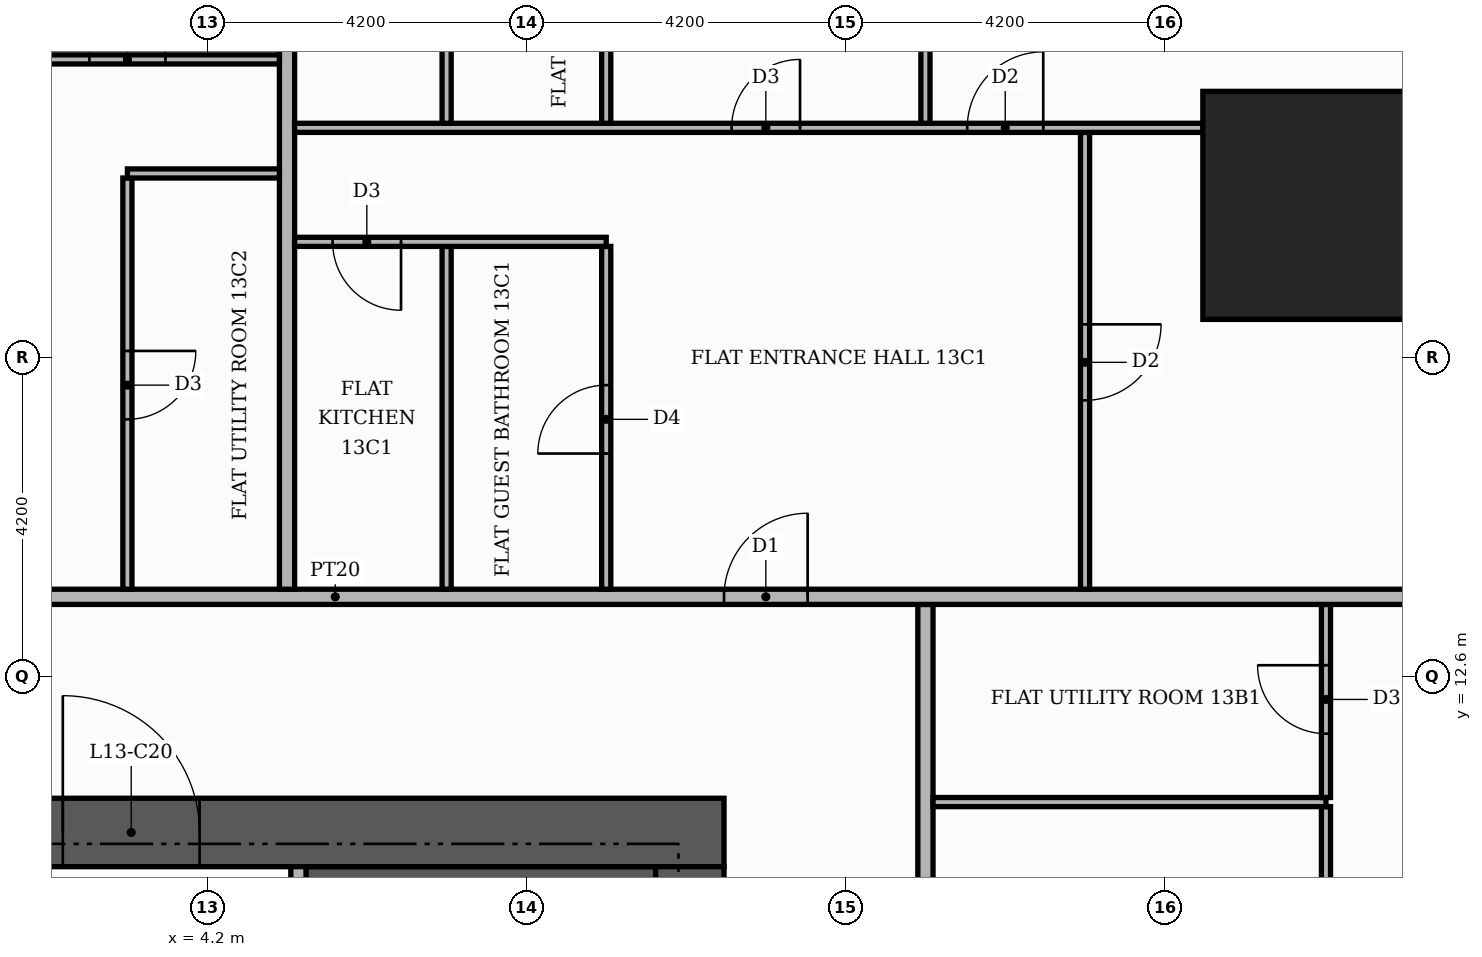
"""IFC4 building model, lengths in metres.
Left out: names, types, materials, properties, quantities, classifications, styles, units other than length and angle.
Written with IfcOpenShell. Run it as: python <this file> out.ifc"""

import sys

from ifc_helpers import new_model, si_unit, direction, frame, frame_2d, origin, origin_2d, place, context, subcontext, project, spatial, rectangle, extrude, element, fill, save


model = new_model("IFC4")
c1 = context("Model", 3, precision=1e-05, world=origin(), true_north=direction((0.0, 1.0)))
c2 = subcontext(c1, "Body", "Model", "MODEL_VIEW")
j1 = project(units=[si_unit("LENGTHUNIT", "METRE"), si_unit("PLANEANGLEUNIT", "RADIAN")], contexts=[c1])
p1 = place(None, origin())
s1 = spatial("IfcSite", under=j1, at=p1, CompositionType="ELEMENT")
p2 = place(p1, origin())
s2 = spatial("IfcBuilding", under=s1, at=p2, CompositionType="ELEMENT")
p3 = place(p2, frame((0.0, 0.0, 58.2)))
s3 = spatial("IfcBuildingStorey", under=s2, at=p3, CompositionType="ELEMENT", Elevation=58.2)
p4 = place(p3, frame((5.5, 9.15, 0.0), z_axis=(0.0, 0.0, 1.0), x_axis=(1.0, 0.0, 0.0)))
e1 = element("IfcWall", 1, at=p4, inside=s3, PredefinedType="SHEAR", context=c2, shape_type="SweptSolid", body=[
    extrude(rectangle(XDim=4.6, YDim=1.9, at=frame_2d((2.3, 0.0))), origin(), (0.0, 0.0, 1.0), 3.48),
])
p5 = place(p3, frame((-11.0, 10.55, 0.0), z_axis=(0.0, 0.0, 1.0), x_axis=(1.0, 0.0, 0.0)))
e2 = element("IfcWall", 2, at=p5, inside=s3, PredefinedType="SHEAR", context=c2, shape_type="SweptSolid", body=[
    extrude(rectangle(XDim=22.0, YDim=0.9, at=frame_2d((11.0, 0.0))), origin(), (0.0, 0.0, 1.0), 3.48),
])
p6 = place(p5, frame((13.3, 0.0, 0.0)))
e3 = element("IfcOpeningElement", 3, at=p6, cuts=e2, PredefinedType="OPENING", context=c2, shape_type="SweptSolid", body=[
    extrude(rectangle(XDim=1.8, YDim=2.2, at=frame_2d((0.9, 1.1))), frame((0.0, 0.46, 0.0), z_axis=(0.0, -1.0, 0.0), x_axis=(1.0, 0.0, 0.0)), (0.0, 0.0, 1.0), 0.92),
])
p7 = place(p3, frame((10.55, -10.1, 0.0), z_axis=(0.0, 0.0, 1.0), x_axis=(0.0, 1.0, 0.0)))
e4 = element("IfcWall", 4, at=p7, inside=s3, PredefinedType="SHEAR", context=c2, shape_type="SweptSolid", body=[
    extrude(rectangle(XDim=20.2, YDim=0.9, at=frame_2d((10.1, 0.0))), origin(), (0.0, 0.0, 1.0), 3.48),
])
p8 = place(p3, frame((18.8, 18.8, 0.0), z_axis=(0.0, 0.0, 1.0), x_axis=(1.0, 0.0, 0.0)))
e5 = element("IfcColumn", 5, at=p8, inside=s3, PredefinedType="COLUMN", context=c2, shape_type="SweptSolid", body=[
    extrude(rectangle(XDim=3.0, YDim=3.0, at=origin_2d()), origin(), (0.0, 0.0, 1.0), 3.9),
])
p9 = place(p3, frame((5.4, 5.5, 0.0), z_axis=(0.0, 0.0, 1.0), x_axis=(0.0, 1.0, 0.0)))
e6 = element("IfcWall", 6, at=p9, inside=s3, PredefinedType="PARTITIONING", context=c2, shape_type="SweptSolid", body=[
    extrude(rectangle(XDim=4.6, YDim=0.2, at=frame_2d((2.3, 0.0))), origin(), (0.0, 0.0, 1.0), 3.48),
])
p10 = place(p9, frame((0.25, 0.0, 0.0)))
e7 = element("IfcOpeningElement", 7, at=p10, cuts=e6, PredefinedType="OPENING", context=c2, shape_type="SweptSolid", body=[
    extrude(rectangle(XDim=1.0, YDim=2.1, at=frame_2d((0.5, 1.05))), frame((0.0, 0.11, 0.0), z_axis=(0.0, -1.0, 0.0), x_axis=(1.0, 0.0, 0.0)), (0.0, 0.0, 1.0), 0.22),
])
p11 = place(p3, frame((13.65, -13.55, 0.0), z_axis=(0.0, 0.0, 1.0), x_axis=(0.0, 1.0, 0.0)))
e8 = element("IfcWall", 8, at=p11, inside=s3, PredefinedType="PARTITIONING", context=c2, shape_type="SweptSolid", body=[
    extrude(rectangle(XDim=27.1, YDim=0.2, at=frame_2d((13.55, 0.0))), origin(), (0.0, 0.0, 1.0), 3.48),
])
p12 = place(p11, frame((1.45, 0.0, 0.0)))
e9 = element("IfcOpeningElement", 9, at=p12, cuts=e8, PredefinedType="OPENING", context=c2, shape_type="SweptSolid", body=[
    extrude(rectangle(XDim=1.1, YDim=2.4, at=frame_2d((0.55, 1.2))), frame((0.0, 0.11, 0.0), z_axis=(0.0, -1.0, 0.0), x_axis=(1.0, 0.0, 0.0)), (0.0, 0.0, 1.0), 0.22),
])
p13 = place(p3, frame((18.92, 7.26, 0.0), z_axis=(0.0, 0.0, 1.0), x_axis=(0.0, 1.0, 0.0)))
e10 = element("IfcWall", 10, at=p13, inside=s3, PredefinedType="PARTITIONING", context=c2, shape_type="SweptSolid", body=[
    extrude(rectangle(XDim=3.63, YDim=0.12, at=frame_2d((1.815, 0.0))), origin(), (0.0, 0.0, 1.0), 3.48),
])
p14 = place(p13, frame((1.365, 0.0, 0.0)))
e11 = element("IfcOpeningElement", 11, at=p14, cuts=e10, PredefinedType="OPENING", context=c2, shape_type="SweptSolid", body=[
    extrude(rectangle(XDim=0.9, YDim=2.1, at=frame_2d((0.45, 1.05))), frame((0.0, 0.07, 0.0), z_axis=(0.0, -1.0, 0.0), x_axis=(1.0, 0.0, 0.0)), (0.0, 0.0, 1.0), 0.14),
])
p15 = place(p3, frame((13.75, 10.95, 0.0), z_axis=(0.0, 0.0, 1.0), x_axis=(1.0, 0.0, 0.0)))
e12 = element("IfcWall", 12, at=p15, inside=s3, PredefinedType="PARTITIONING", context=c2, shape_type="SweptSolid", body=[
    extrude(rectangle(XDim=5.17, YDim=0.12, at=frame_2d((2.585, 0.0))), origin(), (0.0, 0.0, 1.0), 3.48),
])
p16 = place(p3, frame((18.92, 11.01, 0.0), z_axis=(0.0, 0.0, 1.0), x_axis=(0.0, 1.0, 0.0)))
e13 = element("IfcWall", 13, at=p16, inside=s3, PredefinedType="PARTITIONING", context=c2, shape_type="SweptSolid", body=[
    extrude(rectangle(XDim=2.54, YDim=0.12, at=frame_2d((1.27, 0.0))), origin(), (0.0, 0.0, 1.0), 3.48),
])
p17 = place(p16, frame((0.84, 0.0, 0.0)))
e14 = element("IfcOpeningElement", 14, at=p17, cuts=e13, PredefinedType="OPENING", context=c2, shape_type="SweptSolid", body=[
    extrude(rectangle(XDim=0.9, YDim=2.1, at=frame_2d((0.45, 1.05))), frame((0.0, 0.07, 0.0), z_axis=(0.0, -1.0, 0.0), x_axis=(1.0, 0.0, 0.0)), (0.0, 0.0, 1.0), 0.14),
])
p18 = place(p3, frame((-13.65, 13.65, 0.0), z_axis=(0.0, 0.0, 1.0), x_axis=(1.0, 0.0, 0.0)))
e15 = element("IfcWall", 15, at=p18, inside=s3, PredefinedType="PARTITIONING", context=c2, shape_type="SweptSolid", body=[
    extrude(rectangle(XDim=39.07, YDim=0.2, at=frame_2d((19.535, 0.0))), origin(), (0.0, 0.0, 1.0), 3.48),
])
p19 = place(p18, frame((24.65, 0.0, 0.0)))
e16 = element("IfcOpeningElement", 16, at=p19, cuts=e15, PredefinedType="OPENING", context=c2, shape_type="SweptSolid", body=[
    extrude(rectangle(XDim=1.1, YDim=2.4, at=frame_2d((0.55, 1.2))), frame((0.0, 0.11, 0.0), z_axis=(0.0, -1.0, 0.0), x_axis=(1.0, 0.0, 0.0)), (0.0, 0.0, 1.0), 0.22),
])
p20 = place(p18, frame((14.15, 0.0, 0.0)))
e17 = element("IfcOpeningElement", 17, at=p20, cuts=e15, PredefinedType="OPENING", context=c2, shape_type="SweptSolid", body=[
    extrude(rectangle(XDim=1.1, YDim=2.4, at=frame_2d((0.55, 1.2))), frame((0.0, 0.11, 0.0), z_axis=(0.0, -1.0, 0.0), x_axis=(1.0, 0.0, 0.0)), (0.0, 0.0, 1.0), 0.22),
])
p21 = place(p3, frame((3.15, 13.75, 0.0), z_axis=(0.0, 0.0, 1.0), x_axis=(0.0, 1.0, 0.0)))
e18 = element("IfcWall", 18, at=p21, inside=s3, PredefinedType="PARTITIONING", context=c2, shape_type="SweptSolid", body=[
    extrude(rectangle(XDim=5.41, YDim=0.12, at=frame_2d((2.705, 0.0))), origin(), (0.0, 0.0, 1.0), 3.48),
])
p22 = place(p21, frame((2.235, 0.0, 0.0)))
e19 = element("IfcOpeningElement", 19, at=p22, cuts=e18, PredefinedType="OPENING", context=c2, shape_type="SweptSolid", body=[
    extrude(rectangle(XDim=0.9, YDim=2.1, at=frame_2d((0.45, 1.05))), frame((0.0, 0.07, 0.0), z_axis=(0.0, -1.0, 0.0), x_axis=(1.0, 0.0, 0.0)), (0.0, 0.0, 1.0), 0.14),
])
p23 = place(p3, frame((5.25, 13.75, 0.0), z_axis=(0.0, 0.0, 1.0), x_axis=(0.0, 1.0, 0.0)))
e20 = element("IfcWall", 20, at=p23, inside=s3, PredefinedType="PARTITIONING", context=c2, shape_type="SweptSolid", body=[
    extrude(rectangle(XDim=11.67, YDim=0.2, at=frame_2d((5.835, 0.0))), origin(), (0.0, 0.0, 1.0), 3.48),
])
p24 = place(p3, frame((7.35, 13.75, 0.0), z_axis=(0.0, 0.0, 1.0), x_axis=(0.0, 1.0, 0.0)))
e21 = element("IfcWall", 21, at=p24, inside=s3, PredefinedType="PARTITIONING", context=c2, shape_type="SweptSolid", body=[
    extrude(rectangle(XDim=4.51, YDim=0.12, at=frame_2d((2.255, 0.0))), origin(), (0.0, 0.0, 1.0), 3.48),
])
p25 = place(p3, frame((9.45, 13.75, 0.0), z_axis=(0.0, 0.0, 1.0), x_axis=(0.0, 1.0, 0.0)))
e22 = element("IfcWall", 22, at=p25, inside=s3, PredefinedType="PARTITIONING", context=c2, shape_type="SweptSolid", body=[
    extrude(rectangle(XDim=4.51, YDim=0.12, at=frame_2d((2.255, 0.0))), origin(), (0.0, 0.0, 1.0), 3.48),
])
p26 = place(p25, frame((1.785, 0.0, 0.0)))
e23 = element("IfcOpeningElement", 23, at=p26, cuts=e22, PredefinedType="OPENING", context=c2, shape_type="SweptSolid", body=[
    extrude(rectangle(XDim=0.9, YDim=2.1, at=frame_2d((0.45, 1.05))), frame((0.0, 0.07, 0.0), z_axis=(0.0, -1.0, 0.0), x_axis=(1.0, 0.0, 0.0)), (0.0, 0.0, 1.0), 0.14),
])
p27 = place(p3, frame((15.75, 13.75, 0.0), z_axis=(0.0, 0.0, 1.0), x_axis=(0.0, 1.0, 0.0)))
e24 = element("IfcWall", 24, at=p27, inside=s3, PredefinedType="PARTITIONING", context=c2, shape_type="SweptSolid", body=[
    extrude(rectangle(XDim=6.01, YDim=0.12, at=frame_2d((3.005, 0.0))), origin(), (0.0, 0.0, 1.0), 3.48),
])
p28 = place(p27, frame((2.485, 0.0, 0.0)))
e25 = element("IfcOpeningElement", 25, at=p28, cuts=e24, PredefinedType="OPENING", context=c2, shape_type="SweptSolid", body=[
    extrude(rectangle(XDim=1.0, YDim=2.1, at=frame_2d((0.5, 1.05))), frame((0.0, 0.07, 0.0), z_axis=(0.0, -1.0, 0.0), x_axis=(1.0, 0.0, 0.0)), (0.0, 0.0, 1.0), 0.14),
])
p29 = place(p3, frame((5.35, 18.32, 0.0), z_axis=(0.0, 0.0, 1.0), x_axis=(1.0, 0.0, 0.0)))
e26 = element("IfcWall", 26, at=p29, inside=s3, PredefinedType="PARTITIONING", context=c2, shape_type="SweptSolid", body=[
    extrude(rectangle(XDim=4.1, YDim=0.12, at=frame_2d((2.05, 0.0))), origin(), (0.0, 0.0, 1.0), 3.48),
])
p30 = place(p29, frame((0.5, 0.0, 0.0)))
e27 = element("IfcOpeningElement", 27, at=p30, cuts=e26, PredefinedType="OPENING", context=c2, shape_type="SweptSolid", body=[
    extrude(rectangle(XDim=0.9, YDim=2.1, at=frame_2d((0.45, 1.05))), frame((0.0, 0.07, 0.0), z_axis=(0.0, -1.0, 0.0), x_axis=(1.0, 0.0, 0.0)), (0.0, 0.0, 1.0), 0.14),
])
p31 = place(p3, frame((3.15, 19.22, 0.0), z_axis=(0.0, 0.0, 1.0), x_axis=(1.0, 0.0, 0.0)))
e28 = element("IfcWall", 28, at=p31, inside=s3, PredefinedType="PARTITIONING", context=c2, shape_type="SweptSolid", body=[
    extrude(rectangle(XDim=2.0, YDim=0.12, at=frame_2d((1.0, 0.0))), origin(), (0.0, 0.0, 1.0), 3.48),
])
p32 = place(p3, frame((5.35, 19.82, 0.0), z_axis=(0.0, 0.0, 1.0), x_axis=(1.0, 0.0, 0.0)))
e29 = element("IfcWall", 29, at=p32, inside=s3, PredefinedType="PARTITIONING", context=c2, shape_type="SweptSolid", body=[
    extrude(rectangle(XDim=11.95, YDim=0.12, at=frame_2d((5.975, 0.0))), origin(), (0.0, 0.0, 1.0), 3.48),
])
p33 = place(p32, frame((8.85, 0.0, 0.0)))
e30 = element("IfcOpeningElement", 30, at=p33, cuts=e29, PredefinedType="OPENING", context=c2, shape_type="SweptSolid", body=[
    extrude(rectangle(XDim=1.0, YDim=2.1, at=frame_2d((0.5, 1.05))), frame((0.0, 0.07, 0.0), z_axis=(0.0, -1.0, 0.0), x_axis=(1.0, 0.0, 0.0)), (0.0, 0.0, 1.0), 0.14),
])
p34 = place(p32, frame((5.75, 0.0, 0.0)))
e31 = element("IfcOpeningElement", 31, at=p34, cuts=e29, PredefinedType="OPENING", context=c2, shape_type="SweptSolid", body=[
    extrude(rectangle(XDim=0.9, YDim=2.1, at=frame_2d((0.45, 1.05))), frame((0.0, 0.07, 0.0), z_axis=(0.0, -1.0, 0.0), x_axis=(1.0, 0.0, 0.0)), (0.0, 0.0, 1.0), 0.14),
])
p35 = place(p3, frame((7.35, 19.88, 0.0), z_axis=(0.0, 0.0, 1.0), x_axis=(0.0, 1.0, 0.0)))
e32 = element("IfcWall", 32, at=p35, inside=s3, PredefinedType="PARTITIONING", context=c2, shape_type="SweptSolid", body=[
    extrude(rectangle(XDim=5.54, YDim=0.12, at=frame_2d((2.77, 0.0))), origin(), (0.0, 0.0, 1.0), 3.48),
])
p36 = place(p35, frame((2.44, 0.0, 0.0)))
e33 = element("IfcOpeningElement", 33, at=p36, cuts=e32, PredefinedType="OPENING", context=c2, shape_type="SweptSolid", body=[
    extrude(rectangle(XDim=0.9, YDim=2.1, at=frame_2d((0.45, 1.05))), frame((0.0, 0.07, 0.0), z_axis=(0.0, -1.0, 0.0), x_axis=(1.0, 0.0, 0.0)), (0.0, 0.0, 1.0), 0.14),
])
p37 = place(p3, frame((9.45, 19.88, 0.0), z_axis=(0.0, 0.0, 1.0), x_axis=(0.0, 1.0, 0.0)))
e34 = element("IfcWall", 34, at=p37, inside=s3, PredefinedType="PARTITIONING", context=c2, shape_type="SweptSolid", body=[
    extrude(rectangle(XDim=5.54, YDim=0.12, at=frame_2d((2.77, 0.0))), origin(), (0.0, 0.0, 1.0), 3.48),
])
p38 = place(p37, frame((2.44, 0.0, 0.0)))
e35 = element("IfcOpeningElement", 35, at=p38, cuts=e34, PredefinedType="OPENING", context=c2, shape_type="SweptSolid", body=[
    extrude(rectangle(XDim=0.9, YDim=2.1, at=frame_2d((0.45, 1.05))), frame((0.0, 0.07, 0.0), z_axis=(0.0, -1.0, 0.0), x_axis=(1.0, 0.0, 0.0)), (0.0, 0.0, 1.0), 0.14),
])
p39 = place(p3, frame((13.65, 19.88, 0.0), z_axis=(0.0, 0.0, 1.0), x_axis=(0.0, 1.0, 0.0)))
e36 = element("IfcWall", 36, at=p39, inside=s3, PredefinedType="PARTITIONING", context=c2, shape_type="SweptSolid", body=[
    extrude(rectangle(XDim=5.54, YDim=0.12, at=frame_2d((2.77, 0.0))), origin(), (0.0, 0.0, 1.0), 3.48),
])
p40 = place(p3, frame((-13.55, 20.72, 0.0), z_axis=(0.0, 0.0, 1.0), x_axis=(1.0, 0.0, 0.0)))
e37 = element("IfcWall", 37, at=p40, inside=s3, PredefinedType="PARTITIONING", context=c2, shape_type="SweptSolid", body=[
    extrude(rectangle(XDim=18.7, YDim=0.12, at=frame_2d((9.35, 0.0))), origin(), (0.0, 0.0, 1.0), 3.48),
])
p41 = place(p40, frame((16.2, 0.0, 0.0)))
e38 = element("IfcOpeningElement", 38, at=p41, cuts=e37, PredefinedType="OPENING", context=c2, shape_type="SweptSolid", body=[
    extrude(rectangle(XDim=1.0, YDim=2.1, at=frame_2d((0.5, 1.05))), frame((0.0, 0.07, 0.0), z_axis=(0.0, -1.0, 0.0), x_axis=(1.0, 0.0, 0.0)), (0.0, 0.0, 1.0), 0.14),
])
p42 = place(p40, frame((12.05, 0.0, 0.0)))
e39 = element("IfcOpeningElement", 39, at=p42, cuts=e37, PredefinedType="OPENING", context=c2, shape_type="SweptSolid", body=[
    extrude(rectangle(XDim=0.9, YDim=2.1, at=frame_2d((0.45, 1.05))), frame((0.0, 0.07, 0.0), z_axis=(0.0, -1.0, 0.0), x_axis=(1.0, 0.0, 0.0)), (0.0, 0.0, 1.0), 0.14),
])
p43 = place(p40, frame((3.65, 0.0, 0.0)))
e40 = element("IfcOpeningElement", 40, at=p43, cuts=e37, PredefinedType="OPENING", context=c2, shape_type="SweptSolid", body=[
    extrude(rectangle(XDim=0.9, YDim=2.1, at=frame_2d((0.45, 1.05))), frame((0.0, 0.07, 0.0), z_axis=(0.0, -1.0, 0.0), x_axis=(1.0, 0.0, 0.0)), (0.0, 0.0, 1.0), 0.14),
])
p44 = place(p6, origin())
e41 = element("IfcDoor", 41, at=p44, inside=s3, OperationType="DOUBLE_DOOR_SINGLE_SWING", PredefinedType="DOOR", context=c2, shape_type="SweptSolid", body=[
    extrude(rectangle(XDim=1.8, YDim=2.2, at=frame_2d((0.9, 1.1))), frame((0.0, 0.025, 0.0), z_axis=(0.0, -1.0, 0.0), x_axis=(1.0, 0.0, 0.0)), (0.0, 0.0, 1.0), 0.05),
])
fill(e3, e41)
p45 = place(p17, origin())
e42 = element("IfcDoor", 42, at=p45, inside=s3, OperationType="SINGLE_SWING_RIGHT", PredefinedType="DOOR", context=c2, shape_type="SweptSolid", body=[
    extrude(rectangle(XDim=0.9, YDim=2.1, at=frame_2d((0.45, 1.05))), frame((0.0, 0.025, 0.0), z_axis=(0.0, -1.0, 0.0), x_axis=(1.0, 0.0, 0.0)), (0.0, 0.0, 1.0), 0.05),
])
fill(e14, e42)
p46 = place(p19, origin())
e43 = element("IfcDoor", 43, at=p46, inside=s3, OperationType="SINGLE_SWING_RIGHT", PredefinedType="DOOR", context=c2, shape_type="SweptSolid", body=[
    extrude(rectangle(XDim=1.1, YDim=2.4, at=frame_2d((0.55, 1.2))), frame((0.0, 0.025, 0.0), z_axis=(0.0, -1.0, 0.0), x_axis=(1.0, 0.0, 0.0)), (0.0, 0.0, 1.0), 0.05),
])
fill(e16, e43)
p47 = place(p28, frame((1.0, 0.0, 0.0), z_axis=(0.0, 0.0, 1.0), x_axis=(-1.0, 0.0, 0.0)))
e44 = element("IfcDoor", 44, at=p47, inside=s3, OperationType="SINGLE_SWING_RIGHT", PredefinedType="DOOR", context=c2, shape_type="SweptSolid", body=[
    extrude(rectangle(XDim=1.0, YDim=2.1, at=frame_2d((0.5, 1.05))), frame((0.0, 0.025, 0.0), z_axis=(0.0, -1.0, 0.0), x_axis=(1.0, 0.0, 0.0)), (0.0, 0.0, 1.0), 0.05),
])
fill(e25, e44)
p48 = place(p26, origin())
e45 = element("IfcDoor", 45, at=p48, inside=s3, OperationType="SINGLE_SWING_LEFT", PredefinedType="DOOR", context=c2, shape_type="SweptSolid", body=[
    extrude(rectangle(XDim=0.9, YDim=2.1, at=frame_2d((0.45, 1.05))), frame((0.0, 0.025, 0.0), z_axis=(0.0, -1.0, 0.0), x_axis=(1.0, 0.0, 0.0)), (0.0, 0.0, 1.0), 0.05),
])
fill(e23, e45)
p49 = place(p30, frame((0.9, 0.0, 0.0), z_axis=(0.0, 0.0, 1.0), x_axis=(-1.0, 0.0, 0.0)))
e46 = element("IfcDoor", 46, at=p49, inside=s3, OperationType="SINGLE_SWING_RIGHT", PredefinedType="DOOR", context=c2, shape_type="SweptSolid", body=[
    extrude(rectangle(XDim=0.9, YDim=2.1, at=frame_2d((0.45, 1.05))), frame((0.0, 0.025, 0.0), z_axis=(0.0, -1.0, 0.0), x_axis=(1.0, 0.0, 0.0)), (0.0, 0.0, 1.0), 0.05),
])
fill(e27, e46)
p50 = place(p33, origin())
e47 = element("IfcDoor", 47, at=p50, inside=s3, OperationType="SINGLE_SWING_RIGHT", PredefinedType="DOOR", context=c2, shape_type="SweptSolid", body=[
    extrude(rectangle(XDim=1.0, YDim=2.1, at=frame_2d((0.5, 1.05))), frame((0.0, 0.025, 0.0), z_axis=(0.0, -1.0, 0.0), x_axis=(1.0, 0.0, 0.0)), (0.0, 0.0, 1.0), 0.05),
])
fill(e30, e47)
p51 = place(p34, origin())
e48 = element("IfcDoor", 48, at=p51, inside=s3, OperationType="SINGLE_SWING_RIGHT", PredefinedType="DOOR", context=c2, shape_type="SweptSolid", body=[
    extrude(rectangle(XDim=0.9, YDim=2.1, at=frame_2d((0.45, 1.05))), frame((0.0, 0.025, 0.0), z_axis=(0.0, -1.0, 0.0), x_axis=(1.0, 0.0, 0.0)), (0.0, 0.0, 1.0), 0.05),
])
fill(e31, e48)
p52 = place(p22, frame((0.9, 0.0, 0.0), z_axis=(0.0, 0.0, 1.0), x_axis=(-1.0, 0.0, 0.0)))
e49 = element("IfcDoor", 49, at=p52, inside=s3, OperationType="SINGLE_SWING_RIGHT", PredefinedType="DOOR", context=c2, shape_type="SweptSolid", body=[
    extrude(rectangle(XDim=0.9, YDim=2.1, at=frame_2d((0.45, 1.05))), frame((0.0, 0.025, 0.0), z_axis=(0.0, -1.0, 0.0), x_axis=(1.0, 0.0, 0.0)), (0.0, 0.0, 1.0), 0.05),
])
fill(e19, e49)
p53 = place(p41, origin())
e50 = element("IfcDoor", 50, at=p53, inside=s3, OperationType="SINGLE_SWING_RIGHT", PredefinedType="DOOR", context=c2, shape_type="SweptSolid", body=[
    extrude(rectangle(XDim=1.0, YDim=2.1, at=frame_2d((0.5, 1.05))), frame((0.0, 0.025, 0.0), z_axis=(0.0, -1.0, 0.0), x_axis=(1.0, 0.0, 0.0)), (0.0, 0.0, 1.0), 0.05),
])
fill(e38, e50)
save(model, sys.argv[1])
